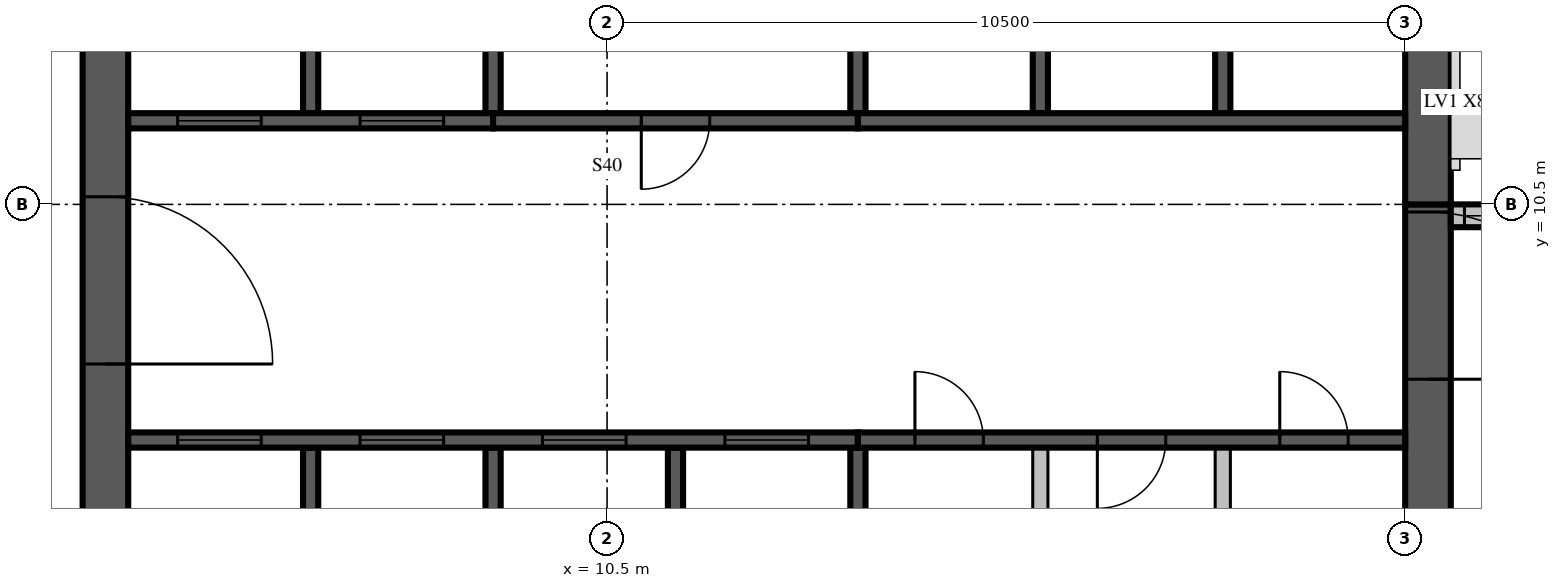
"""IFC4 building model, lengths in metres.
Left out: names, types, materials, properties, quantities, classifications, styles, units other than length and angle.
Written with IfcOpenShell. Run it as: python <this file> out.ifc"""

import sys

from ifc_helpers import new_model, si_unit, direction, frame, frame_2d, origin, place, context, subcontext, project, spatial, rectangle, extrude, source, transform, mapped, element, fill, save


model = new_model("IFC4")
c1 = context("Model", 3, precision=1e-05, world=origin(), true_north=direction((0.0, 1.0)))
c2 = subcontext(c1, "Body", "Model", "MODEL_VIEW")
j1 = project(units=[si_unit("LENGTHUNIT", "METRE"), si_unit("PLANEANGLEUNIT", "RADIAN")], contexts=[c1])
p1 = place(None, origin())
s1 = spatial("IfcSite", under=j1, at=p1, CompositionType="ELEMENT")
p2 = place(p1, origin())
s2 = spatial("IfcBuilding", under=s1, at=p2, CompositionType="ELEMENT")
p3 = place(p2, frame((0.0, 0.0, 365.0)))
s3 = spatial("IfcBuildingStorey", under=s2, at=p3, CompositionType="ELEMENT", Elevation=365.0)
m1 = source(origin(), c2, "Body", "SweptSolid", [
    extrude(rectangle(XDim=17.4, YDim=0.6, at=frame_2d((8.7, 0.0))), origin(), (0.0, 0.0, 1.0), 3.5),
])
p4 = place(p3, frame((3.9, 4.2, 0.0), z_axis=(0.0, 0.0, 1.0), x_axis=(0.0, 1.0, 0.0)))
e1 = element("IfcWall", 1, at=p4, inside=s3, PredefinedType="SHEAR", context=c2, shape_type="MappedRepresentation", body=[
    mapped(m1, transform((0.0, 0.0, 0.0), scale=1.0)),
])
m2 = source(origin(), c2, "Body", "SweptSolid", [
    extrude(rectangle(XDim=2.2, YDim=2.1, at=frame_2d((1.1, 1.05))), frame((0.0, 0.31, 0.0), z_axis=(0.0, -1.0, 0.0), x_axis=(1.0, 0.0, 0.0)), (0.0, 0.0, 1.0), 0.62),
])
p5 = place(p4, frame((4.2, 0.0, 0.0)))
e2 = element("IfcOpeningElement", 2, at=p5, cuts=e1, PredefinedType="OPENING", context=c2, shape_type="MappedRepresentation", body=[
    mapped(m2, transform((0.0, 0.0, 0.0), scale=1.0)),
])
m3 = source(origin(), c2, "Body", "SweptSolid", [
    extrude(rectangle(XDim=6.3, YDim=0.6, at=frame_2d((3.15, 0.0))), origin(), (0.0, 0.0, 1.0), 3.5),
])
p6 = place(p3, frame((21.3, 4.2, 0.0), z_axis=(0.0, 0.0, 1.0), x_axis=(0.0, 1.0, 0.0)))
e3 = element("IfcWall", 3, at=p6, inside=s3, PredefinedType="SHEAR", context=c2, shape_type="MappedRepresentation", body=[
    mapped(m3, transform((0.0, 0.0, 0.0), scale=1.0)),
])
p7 = place(p6, frame((4.0, 0.0, 0.0)))
e4 = element("IfcOpeningElement", 4, at=p7, cuts=e3, PredefinedType="OPENING", context=c2, shape_type="MappedRepresentation", body=[
    mapped(m2, transform((0.0, 0.0, 0.0), scale=1.0)),
])
m4 = source(origin(), c2, "Body", "SweptSolid", [
    extrude(rectangle(XDim=10.5, YDim=0.6, at=frame_2d((5.25, 0.0))), origin(), (0.0, 0.0, 1.0), 3.5),
])
p8 = place(p3, frame((21.3, 10.5, 0.0), z_axis=(0.0, 0.0, 1.0), x_axis=(0.0, 1.0, 0.0)))
e5 = element("IfcWall", 5, at=p8, inside=s3, PredefinedType="SHEAR", context=c2, shape_type="MappedRepresentation", body=[
    mapped(m4, transform((0.0, 0.0, 0.0), scale=1.0)),
])
m5 = source(origin(), c2, "Body", "SweptSolid", [
    extrude(rectangle(XDim=1.2, YDim=2.4, at=frame_2d((0.6, 1.2))), frame((0.0, 0.31, 0.0), z_axis=(0.0, -1.0, 0.0), x_axis=(1.0, 0.0, 0.0)), (0.0, 0.0, 1.0), 0.62),
])
p9 = place(p8, frame((5.7, 0.0, 0.6)))
e6 = element("IfcOpeningElement", 6, at=p9, cuts=e5, PredefinedType="OPENING", context=c2, shape_type="MappedRepresentation", body=[
    mapped(m5, transform((0.0, 0.0, 0.0), scale=1.0)),
])
p10 = place(p3, frame((29.1, 10.35, 0.0), z_axis=(0.0, 0.0, 1.0), x_axis=(-1.0, 0.0, 0.0)))
e7 = element("IfcWall", 7, at=p10, inside=s3, PredefinedType="STANDARD", context=c2, shape_type="SweptSolid", body=[
    extrude(rectangle(XDim=7.5, YDim=0.3, at=frame_2d((3.75, 0.0))), origin(), (0.0, 0.0, 1.0), 3.05),
])
m6 = source(origin(), c2, "Body", "SweptSolid", [
    extrude(rectangle(XDim=3.0, YDim=2.0, at=frame_2d((1.5, 1.0))), frame((0.0, 0.16, 0.0), z_axis=(0.0, -1.0, 0.0), x_axis=(1.0, 0.0, 0.0)), (0.0, 0.0, 1.0), 0.32),
])
p11 = place(p10, frame((1.14, 0.0, 0.6)))
e8 = element("IfcOpeningElement", 8, at=p11, cuts=e7, PredefinedType="OPENING", context=c2, shape_type="MappedRepresentation", body=[
    mapped(m6, transform((0.0, 0.0, 0.0), scale=1.0)),
])
m7 = source(origin(), c2, "Body", "SweptSolid", [
    extrude(rectangle(XDim=1.8, YDim=2.0, at=frame_2d((0.9, 1.0))), frame((0.0, 0.16, 0.0), z_axis=(0.0, -1.0, 0.0), x_axis=(1.0, 0.0, 0.0)), (0.0, 0.0, 1.0), 0.32),
])
p12 = place(p10, frame((5.52, 0.0, 0.6)))
e9 = element("IfcOpeningElement", 9, at=p12, cuts=e7, PredefinedType="OPENING", context=c2, shape_type="MappedRepresentation", body=[
    mapped(m7, transform((0.0, 0.0, 0.0), scale=1.0)),
])
m8 = source(origin(), c2, "Body", "SweptSolid", [
    extrude(rectangle(XDim=3.1, YDim=0.2, at=frame_2d((1.55, 0.0))), origin(), (0.0, 0.0, 1.0), 3.5),
])
for number, where, z_axis, x_axis in (
    (10, (6.6, 4.2, 0.0), (0.0, 0.0, 1.0), (0.0, 1.0, 0.0)),
    (11, (9.0, 4.2, 0.0), (0.0, 0.0, 1.0), (0.0, 1.0, 0.0)),
    (12, (11.4, 4.2, 0.0), (0.0, 0.0, 1.0), (0.0, 1.0, 0.0)),
):
    element("IfcWall", number, at=place(p3, frame(where, z_axis=z_axis, x_axis=x_axis)), inside=s3, PredefinedType="SOLIDWALL", context=c2, shape_type="MappedRepresentation", body=[
        mapped(m8, transform((0.0, 0.0, 0.0), scale=1.0)),
    ])
p13 = place(p3, frame((13.8, 4.2, 0.0), z_axis=(0.0, 0.0, 1.0), x_axis=(0.0, 1.0, 0.0)))
e13 = element("IfcWall", 13, at=p13, inside=s3, PredefinedType="SOLIDWALL", context=c2, shape_type="SweptSolid", body=[
    extrude(rectangle(XDim=3.1, YDim=0.2, at=frame_2d((1.55, 0.0))), origin(), (0.0, 0.0, 1.0), 3.05),
])
p14 = place(p3, frame((16.2, 4.2, 0.0), z_axis=(0.0, 0.0, 1.0), x_axis=(0.0, 1.0, 0.0)))
e14 = element("IfcWall", 14, at=p14, inside=s3, PredefinedType="PARTITIONING", context=c2, shape_type="SweptSolid", body=[
    extrude(rectangle(XDim=3.1, YDim=0.2, at=frame_2d((1.55, 0.0))), origin(), (0.0, 0.0, 1.0), 3.05),
])
m9 = source(origin(), c2, "Body", "SweptSolid", [
    extrude(rectangle(XDim=3.1, YDim=0.2, at=frame_2d((1.55, 0.0))), origin(), (0.0, 0.0, 1.0), 3.05),
])
p15 = place(p3, frame((18.6, 4.2, 0.0), z_axis=(0.0, 0.0, 1.0), x_axis=(0.0, 1.0, 0.0)))
e15 = element("IfcWall", 15, at=p15, inside=s3, PredefinedType="PARTITIONING", context=c2, shape_type="MappedRepresentation", body=[
    mapped(m9, transform((0.0, 0.0, 0.0), scale=1.0)),
])
m10 = source(origin(), c2, "Body", "SweptSolid", [
    extrude(rectangle(XDim=3.0, YDim=0.2, at=frame_2d((1.5, 0.0))), origin(), (0.0, 0.0, 1.0), 3.5),
])
p16 = place(p3, frame((6.6, 11.7, 0.0), z_axis=(0.0, 0.0, 1.0), x_axis=(0.0, 1.0, 0.0)))
e16 = element("IfcWall", 16, at=p16, inside=s3, PredefinedType="SOLIDWALL", context=c2, shape_type="MappedRepresentation", body=[
    mapped(m10, transform((0.0, 0.0, 0.0), scale=1.0)),
])
p17 = place(p3, frame((9.0, 11.7, 0.0), z_axis=(0.0, 0.0, 1.0), x_axis=(0.0, 1.0, 0.0)))
e17 = element("IfcWall", 17, at=p17, inside=s3, PredefinedType="SOLIDWALL", context=c2, shape_type="SweptSolid", body=[
    extrude(rectangle(XDim=3.0, YDim=0.2, at=frame_2d((1.5, 0.0))), origin(), (0.0, 0.0, 1.0), 3.05),
])
m11 = source(origin(), c2, "Body", "SweptSolid", [
    extrude(rectangle(XDim=3.0, YDim=0.2, at=frame_2d((1.5, 0.0))), origin(), (0.0, 0.0, 1.0), 3.05),
])
p18 = place(p3, frame((13.8, 11.7, 0.0), z_axis=(0.0, 0.0, 1.0), x_axis=(0.0, 1.0, 0.0)))
e18 = element("IfcWall", 18, at=p18, inside=s3, PredefinedType="SOLIDWALL", context=c2, shape_type="MappedRepresentation", body=[
    mapped(m11, transform((0.0, 0.0, 0.0), scale=1.0)),
])
for number, where, z_axis, x_axis in (
    (19, (16.2, 11.7, 0.0), (0.0, 0.0, 1.0), (0.0, 1.0, 0.0)),
    (20, (18.6, 11.7, 0.0), (0.0, 0.0, 1.0), (0.0, 1.0, 0.0)),
):
    element("IfcWall", number, at=place(p3, frame(where, z_axis=z_axis, x_axis=x_axis)), inside=s3, PredefinedType="SOLIDWALL", context=c2, shape_type="MappedRepresentation", body=[
        mapped(m10, transform((0.0, 0.0, 0.0), scale=1.0)),
    ])
m12 = source(origin(), c2, "Body", "SweptSolid", [
    extrude(rectangle(XDim=9.6, YDim=0.2, at=frame_2d((4.8, 0.0))), origin(), (0.0, 0.0, 1.0), 3.5),
])
p19 = place(p3, frame((4.2, 7.4, 0.0), z_axis=(0.0, 0.0, 1.0), x_axis=(1.0, 0.0, 0.0)))
e21 = element("IfcWall", 21, at=p19, inside=s3, PredefinedType="SOLIDWALL", context=c2, shape_type="MappedRepresentation", body=[
    mapped(m12, transform((0.0, 0.0, 0.0), scale=1.0)),
])
m13 = source(origin(), c2, "Body", "SweptSolid", [
    extrude(rectangle(XDim=1.1, YDim=2.1, at=frame_2d((0.55, 1.05))), frame((0.0, 0.11, 0.0), z_axis=(0.0, -1.0, 0.0), x_axis=(1.0, 0.0, 0.0)), (0.0, 0.0, 1.0), 0.22),
])
p20 = place(p19, frame((0.65, 0.0, 0.0)))
e22 = element("IfcOpeningElement", 22, at=p20, cuts=e21, PredefinedType="OPENING", context=c2, shape_type="MappedRepresentation", body=[
    mapped(m13, transform((0.0, 0.0, 0.0), scale=1.0)),
])
p21 = place(p19, frame((3.05, 0.0, 0.0)))
e23 = element("IfcOpeningElement", 23, at=p21, cuts=e21, PredefinedType="OPENING", context=c2, shape_type="MappedRepresentation", body=[
    mapped(m13, transform((0.0, 0.0, 0.0), scale=1.0)),
])
p22 = place(p19, frame((5.45, 0.0, 0.0)))
e24 = element("IfcOpeningElement", 24, at=p22, cuts=e21, PredefinedType="OPENING", context=c2, shape_type="MappedRepresentation", body=[
    mapped(m13, transform((0.0, 0.0, 0.0), scale=1.0)),
])
p23 = place(p19, frame((7.85, 0.0, 0.0)))
e25 = element("IfcOpeningElement", 25, at=p23, cuts=e21, PredefinedType="OPENING", context=c2, shape_type="MappedRepresentation", body=[
    mapped(m13, transform((0.0, 0.0, 0.0), scale=1.0)),
])
p24 = place(p3, frame((13.8, 7.4, 0.0), z_axis=(0.0, 0.0, 1.0), x_axis=(1.0, 0.0, 0.0)))
e26 = element("IfcWall", 26, at=p24, inside=s3, PredefinedType="SOLIDWALL", context=c2, shape_type="SweptSolid", body=[
    extrude(rectangle(XDim=7.2, YDim=0.2, at=frame_2d((3.6, 0.0))), origin(), (0.0, 0.0, 1.0), 3.05),
])
m14 = source(origin(), c2, "Body", "SweptSolid", [
    extrude(rectangle(XDim=0.9, YDim=2.1, at=frame_2d((0.45, 1.05))), frame((0.0, 0.11, 0.0), z_axis=(0.0, -1.0, 0.0), x_axis=(1.0, 0.0, 0.0)), (0.0, 0.0, 1.0), 0.22),
])
p25 = place(p24, frame((0.75, 0.0, 0.0)))
e27 = element("IfcOpeningElement", 27, at=p25, cuts=e26, PredefinedType="OPENING", context=c2, shape_type="MappedRepresentation", body=[
    mapped(m14, transform((0.0, 0.0, 0.0), scale=1.0)),
])
p26 = place(p24, frame((3.15, 0.0, 0.0)))
e28 = element("IfcOpeningElement", 28, at=p26, cuts=e26, PredefinedType="OPENING", context=c2, shape_type="MappedRepresentation", body=[
    mapped(m14, transform((0.0, 0.0, 0.0), scale=1.0)),
])
p27 = place(p24, frame((5.55, 0.0, 0.0)))
e29 = element("IfcOpeningElement", 29, at=p27, cuts=e26, PredefinedType="OPENING", context=c2, shape_type="MappedRepresentation", body=[
    mapped(m14, transform((0.0, 0.0, 0.0), scale=1.0)),
])
m15 = source(origin(), c2, "Body", "SweptSolid", [
    extrude(rectangle(XDim=4.8, YDim=0.2, at=frame_2d((2.4, 0.0))), origin(), (0.0, 0.0, 1.0), 3.5),
])
p28 = place(p3, frame((4.2, 11.6, 0.0), z_axis=(0.0, 0.0, 1.0), x_axis=(1.0, 0.0, 0.0)))
e30 = element("IfcWall", 30, at=p28, inside=s3, PredefinedType="SOLIDWALL", context=c2, shape_type="MappedRepresentation", body=[
    mapped(m15, transform((0.0, 0.0, 0.0), scale=1.0)),
])
p29 = place(p28, frame((0.65, 0.0, 0.0)))
e31 = element("IfcOpeningElement", 31, at=p29, cuts=e30, PredefinedType="OPENING", context=c2, shape_type="MappedRepresentation", body=[
    mapped(m13, transform((0.0, 0.0, 0.0), scale=1.0)),
])
p30 = place(p28, frame((3.05, 0.0, 0.0)))
e32 = element("IfcOpeningElement", 32, at=p30, cuts=e30, PredefinedType="OPENING", context=c2, shape_type="MappedRepresentation", body=[
    mapped(m13, transform((0.0, 0.0, 0.0), scale=1.0)),
])
p31 = place(p3, frame((9.0, 11.6, 0.0), z_axis=(0.0, 0.0, 1.0), x_axis=(1.0, 0.0, 0.0)))
e33 = element("IfcWall", 33, at=p31, inside=s3, PredefinedType="SOLIDWALL", context=c2, shape_type="SweptSolid", body=[
    extrude(rectangle(XDim=4.8, YDim=0.2, at=frame_2d((2.4, 0.0))), origin(), (0.0, 0.0, 1.0), 3.05),
])
p32 = place(p31, frame((1.95, 0.0, 0.0)))
e34 = element("IfcOpeningElement", 34, at=p32, cuts=e33, PredefinedType="OPENING", context=c2, shape_type="MappedRepresentation", body=[
    mapped(m14, transform((0.0, 0.0, 0.0), scale=1.0)),
])
m16 = source(origin(), c2, "Body", "SweptSolid", [
    extrude(rectangle(XDim=7.2, YDim=0.2, at=frame_2d((3.6, 0.0))), origin(), (0.0, 0.0, 1.0), 3.5),
])
p33 = place(p3, frame((13.8, 11.6, 0.0), z_axis=(0.0, 0.0, 1.0), x_axis=(1.0, 0.0, 0.0)))
e35 = element("IfcWall", 35, at=p33, inside=s3, PredefinedType="SOLIDWALL", context=c2, shape_type="MappedRepresentation", body=[
    mapped(m16, transform((0.0, 0.0, 0.0), scale=1.0)),
])
m17 = source(origin(), c2, "Body", "SweptSolid", [
    extrude(rectangle(XDim=1.8, YDim=2.0, at=frame_2d((0.9, 1.0))), frame((0.0, 0.03, 0.0), z_axis=(0.0, -1.0, 0.0), x_axis=(1.0, 0.0, 0.0)), (0.0, 0.0, 1.0), 0.06),
])
p34 = place(p12, origin())
e36 = element("IfcWindow", 36, at=p34, inside=s3, PartitioningType="SINGLE_PANEL", PredefinedType="WINDOW", context=c2, shape_type="MappedRepresentation", body=[
    mapped(m17, transform((0.0, 0.0, 0.0), scale=1.0)),
])
fill(e9, e36)
m18 = source(origin(), c2, "Body", "SweptSolid", [
    extrude(rectangle(XDim=1.1, YDim=2.1, at=frame_2d((0.55, 1.05))), frame((0.0, 0.025, 0.0), z_axis=(0.0, -1.0, 0.0), x_axis=(1.0, 0.0, 0.0)), (0.0, 0.0, 1.0), 0.05),
])
p35 = place(p20, origin())
e37 = element("IfcDoor", 37, at=p35, inside=s3, OperationType="SLIDING_TO_LEFT", PredefinedType="DOOR", context=c2, shape_type="MappedRepresentation", body=[
    mapped(m18, transform((0.0, 0.0, 0.0), scale=1.0)),
])
fill(e22, e37)
p36 = place(p21, origin())
e38 = element("IfcDoor", 38, at=p36, inside=s3, OperationType="SLIDING_TO_LEFT", PredefinedType="DOOR", context=c2, shape_type="MappedRepresentation", body=[
    mapped(m18, transform((0.0, 0.0, 0.0), scale=1.0)),
])
fill(e23, e38)
p37 = place(p22, origin())
e39 = element("IfcDoor", 39, at=p37, inside=s3, OperationType="SLIDING_TO_LEFT", PredefinedType="DOOR", context=c2, shape_type="MappedRepresentation", body=[
    mapped(m18, transform((0.0, 0.0, 0.0), scale=1.0)),
])
fill(e24, e39)
p38 = place(p23, origin())
e40 = element("IfcDoor", 40, at=p38, inside=s3, OperationType="SLIDING_TO_LEFT", PredefinedType="DOOR", context=c2, shape_type="MappedRepresentation", body=[
    mapped(m18, transform((0.0, 0.0, 0.0), scale=1.0)),
])
fill(e25, e40)
m19 = source(origin(), c2, "Body", "SweptSolid", [
    extrude(rectangle(XDim=0.9, YDim=2.1, at=frame_2d((0.45, 1.05))), frame((0.0, 0.025, 0.0), z_axis=(0.0, -1.0, 0.0), x_axis=(1.0, 0.0, 0.0)), (0.0, 0.0, 1.0), 0.05),
])
p39 = place(p25, origin())
e41 = element("IfcDoor", 41, at=p39, inside=s3, OperationType="SINGLE_SWING_LEFT", PredefinedType="DOOR", context=c2, shape_type="MappedRepresentation", body=[
    mapped(m19, transform((0.0, 0.0, 0.0), scale=1.0)),
])
fill(e27, e41)
p40 = place(p26, origin())
e42 = element("IfcDoor", 42, at=p40, inside=s3, OperationType="SINGLE_SWING_RIGHT", PredefinedType="DOOR", context=c2, shape_type="MappedRepresentation", body=[
    mapped(m19, transform((0.0, 0.0, 0.0), scale=1.0)),
])
fill(e28, e42)
p41 = place(p27, origin())
e43 = element("IfcDoor", 43, at=p41, inside=s3, OperationType="SINGLE_SWING_LEFT", PredefinedType="DOOR", context=c2, shape_type="MappedRepresentation", body=[
    mapped(m19, transform((0.0, 0.0, 0.0), scale=1.0)),
])
fill(e29, e43)
p42 = place(p29, origin())
e44 = element("IfcDoor", 44, at=p42, inside=s3, OperationType="SLIDING_TO_LEFT", PredefinedType="DOOR", context=c2, shape_type="MappedRepresentation", body=[
    mapped(m18, transform((0.0, 0.0, 0.0), scale=1.0)),
])
fill(e31, e44)
p43 = place(p30, origin())
e45 = element("IfcDoor", 45, at=p43, inside=s3, OperationType="SLIDING_TO_LEFT", PredefinedType="DOOR", context=c2, shape_type="MappedRepresentation", body=[
    mapped(m18, transform((0.0, 0.0, 0.0), scale=1.0)),
])
fill(e32, e45)
p44 = place(p32, origin())
e46 = element("IfcDoor", 46, at=p44, inside=s3, OperationType="SINGLE_SWING_RIGHT", PredefinedType="DOOR", context=c2, shape_type="MappedRepresentation", body=[
    mapped(m19, transform((0.0, 0.0, 0.0), scale=1.0)),
])
fill(e34, e46)
m20 = source(origin(), c2, "Body", "SweptSolid", [
    extrude(rectangle(XDim=2.2, YDim=2.1, at=frame_2d((1.1, 1.05))), frame((0.0, 0.025, 0.0), z_axis=(0.0, -1.0, 0.0), x_axis=(1.0, 0.0, 0.0)), (0.0, 0.0, 1.0), 0.05),
])
p45 = place(p7, origin())
e47 = element("IfcDoor", 47, at=p45, inside=s3, OperationType="DOUBLE_DOOR_SINGLE_SWING", PredefinedType="DOOR", context=c2, shape_type="MappedRepresentation", body=[
    mapped(m20, transform((0.0, 0.0, 0.0), scale=1.0)),
])
fill(e4, e47)
p46 = place(p5, origin())
e48 = element("IfcDoor", 48, at=p46, inside=s3, OperationType="DOUBLE_DOOR_SINGLE_SWING", PredefinedType="DOOR", context=c2, shape_type="MappedRepresentation", body=[
    mapped(m20, transform((0.0, 0.0, 0.0), scale=1.0)),
])
fill(e2, e48)
save(model, sys.argv[1])
